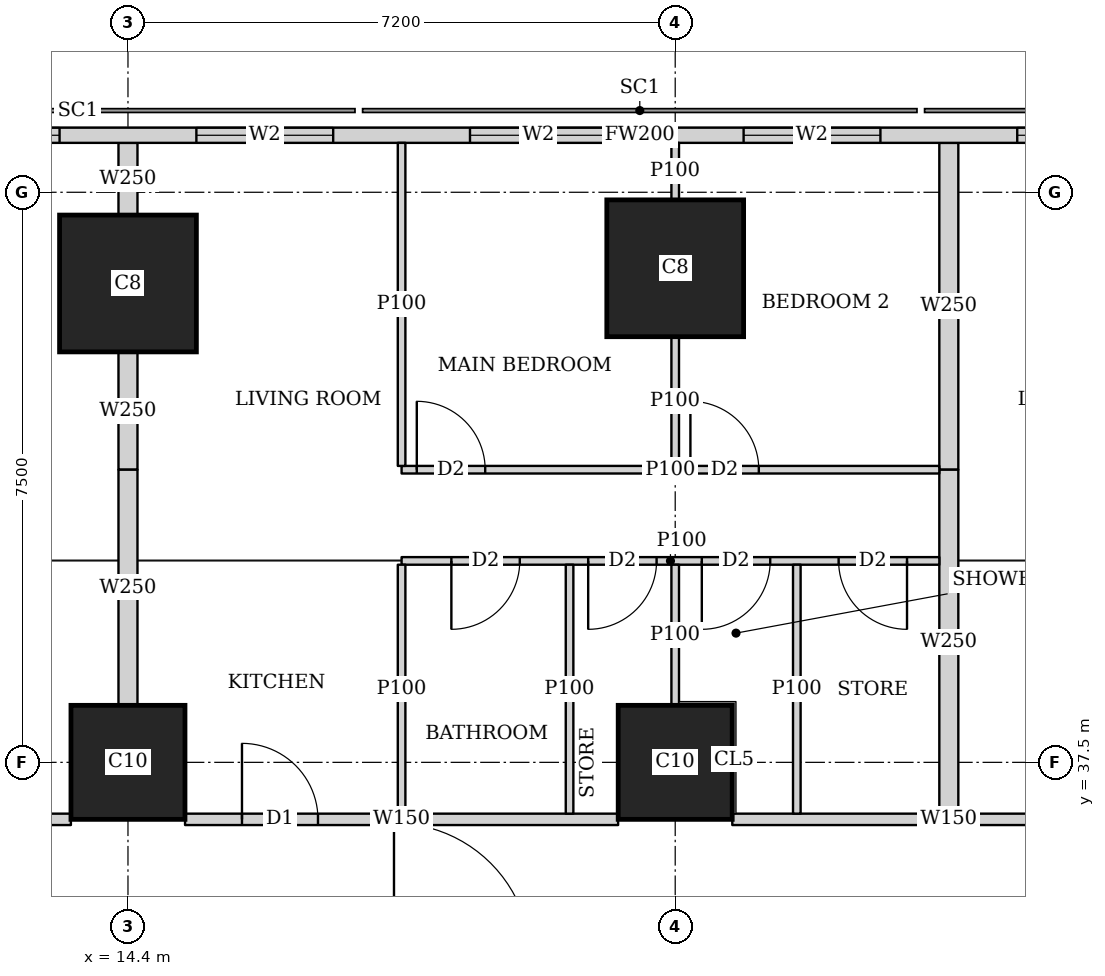
"""IFC4 building model, lengths in metres.
Left out: names, types, materials, properties, quantities, classifications, styles, units other than length and angle.
Written with IfcOpenShell. Run it as: python <this file> out.ifc"""

import sys

from ifc_helpers import new_model, si_unit, direction, frame, frame_2d, origin, origin_2d, place, context, subcontext, project, spatial, rectangle, extrude, element, fill, save


model = new_model("IFC4")
c1 = context("Model", 3, precision=1e-05, world=origin(), true_north=direction((0.0, 1.0)))
c2 = subcontext(c1, "Body", "Model", "MODEL_VIEW")
j1 = project(units=[si_unit("LENGTHUNIT", "METRE"), si_unit("PLANEANGLEUNIT", "RADIAN")], contexts=[c1])
p1 = place(None, origin())
s1 = spatial("IfcSite", under=j1, at=p1, CompositionType="ELEMENT")
p2 = place(p1, origin())
s2 = spatial("IfcBuilding", under=s1, at=p2, CompositionType="ELEMENT")
p3 = place(p2, frame((0.0, 0.0, 147.05)))
s3 = spatial("IfcBuildingStorey", under=s2, at=p3, CompositionType="ELEMENT", Elevation=147.05)
for number, where, z_axis, x_axis in (
    (1, (14.4, 37.5, 0.0), (0.0, 0.0, 1.0), (1.0, 0.0, 0.0)),
    (2, (21.6, 37.5, 0.0), (0.0, 0.0, 1.0), (1.0, 0.0, 0.0)),
):
    element("IfcColumn", number, at=place(p3, frame(where, z_axis=z_axis, x_axis=x_axis)), inside=s3, PredefinedType="COLUMN", context=c2, shape_type="SweptSolid", body=[
        extrude(rectangle(XDim=1.5, YDim=1.5, at=origin_2d()), origin(), (0.0, 0.0, 1.0), 3.75),
    ])
for number, where, z_axis, x_axis in (
    (3, (14.4, 43.8, 0.0), (0.0, 0.0, 1.0), (1.0, 0.0, 0.0)),
    (4, (21.6, 44.0, 0.0), (0.0, 0.0, 1.0), (1.0, 0.0, 0.0)),
):
    element("IfcColumn", number, at=place(p3, frame(where, z_axis=z_axis, x_axis=x_axis)), inside=s3, PredefinedType="COLUMN", context=c2, shape_type="SweptSolid", body=[
        extrude(rectangle(XDim=1.8, YDim=1.8, at=origin_2d()), origin(), (0.0, 0.0, 1.0), 3.75),
    ])
p4 = place(p3, frame((40.106, 45.75, 0.0), z_axis=(0.0, 0.0, 1.0), x_axis=(-1.0, 0.0, 0.0)))
e5 = element("IfcWall", 5, at=p4, inside=s3, PredefinedType="SOLIDWALL", context=c2, shape_type="SweptSolid", body=[
    extrude(rectangle(XDim=37.943, YDim=0.2, at=frame_2d((18.971, 0.0))), origin(), (0.0, 0.0, 1.0), 3.5),
])
p5 = place(p4, frame((8.606, 0.0, 0.9)))
e6 = element("IfcOpeningElement", 6, at=p5, cuts=e5, PredefinedType="OPENING", context=c2, shape_type="SweptSolid", body=[
    extrude(rectangle(XDim=1.8, YDim=1.5, at=frame_2d((0.9, 0.75))), frame((0.0, 0.11, 0.0), z_axis=(0.0, -1.0, 0.0), x_axis=(1.0, 0.0, 0.0)), (0.0, 0.0, 1.0), 0.22),
])
p6 = place(p4, frame((12.206, 0.0, 0.9)))
e7 = element("IfcOpeningElement", 7, at=p6, cuts=e5, PredefinedType="OPENING", context=c2, shape_type="SweptSolid", body=[
    extrude(rectangle(XDim=1.8, YDim=1.5, at=frame_2d((0.9, 0.75))), frame((0.0, 0.11, 0.0), z_axis=(0.0, -1.0, 0.0), x_axis=(1.0, 0.0, 0.0)), (0.0, 0.0, 1.0), 0.22),
])
p7 = place(p4, frame((15.806, 0.0, 0.9)))
e8 = element("IfcOpeningElement", 8, at=p7, cuts=e5, PredefinedType="OPENING", context=c2, shape_type="SweptSolid", body=[
    extrude(rectangle(XDim=1.8, YDim=1.5, at=frame_2d((0.9, 0.75))), frame((0.0, 0.11, 0.0), z_axis=(0.0, -1.0, 0.0), x_axis=(1.0, 0.0, 0.0)), (0.0, 0.0, 1.0), 0.22),
])
p8 = place(p4, frame((19.406, 0.0, 0.9)))
e9 = element("IfcOpeningElement", 9, at=p8, cuts=e5, PredefinedType="OPENING", context=c2, shape_type="SweptSolid", body=[
    extrude(rectangle(XDim=1.8, YDim=1.5, at=frame_2d((0.9, 0.75))), frame((0.0, 0.11, 0.0), z_axis=(0.0, -1.0, 0.0), x_axis=(1.0, 0.0, 0.0)), (0.0, 0.0, 1.0), 0.22),
])
p9 = place(p4, frame((23.006, 0.0, 0.9)))
e10 = element("IfcOpeningElement", 10, at=p9, cuts=e5, PredefinedType="OPENING", context=c2, shape_type="SweptSolid", body=[
    extrude(rectangle(XDim=1.8, YDim=1.5, at=frame_2d((0.9, 0.75))), frame((0.0, 0.11, 0.0), z_axis=(0.0, -1.0, 0.0), x_axis=(1.0, 0.0, 0.0)), (0.0, 0.0, 1.0), 0.22),
])
p10 = place(p4, frame((26.606, 0.0, 0.9)))
e11 = element("IfcOpeningElement", 11, at=p10, cuts=e5, PredefinedType="OPENING", context=c2, shape_type="SweptSolid", body=[
    extrude(rectangle(XDim=1.8, YDim=1.5, at=frame_2d((0.9, 0.75))), frame((0.0, 0.11, 0.0), z_axis=(0.0, -1.0, 0.0), x_axis=(1.0, 0.0, 0.0)), (0.0, 0.0, 1.0), 0.22),
])
p11 = place(p3, frame((8.1, 36.75, 0.0), z_axis=(0.0, 0.0, 1.0), x_axis=(1.0, 0.0, 0.0)))
e12 = element("IfcWall", 12, at=p11, inside=s3, PredefinedType="SOLIDWALL", context=c2, shape_type="SweptSolid", body=[
    extrude(rectangle(XDim=5.549, YDim=0.15, at=frame_2d((2.774, 0.0))), origin(), (0.0, 0.0, 1.0), 3.5),
])
p12 = place(p11, frame((3.739, 0.0, 0.0)))
e13 = element("IfcOpeningElement", 13, at=p12, cuts=e12, PredefinedType="OPENING", context=c2, shape_type="SweptSolid", body=[
    extrude(rectangle(XDim=1.0, YDim=2.1, at=frame_2d((0.5, 1.05))), frame((0.0, 0.085, 0.0), z_axis=(0.0, -1.0, 0.0), x_axis=(1.0, 0.0, 0.0)), (0.0, 0.0, 1.0), 0.17),
])
p13 = place(p3, frame((15.151, 36.75, 0.0), z_axis=(0.0, 0.0, 1.0), x_axis=(1.0, 0.0, 0.0)))
e14 = element("IfcWall", 14, at=p13, inside=s3, PredefinedType="SOLIDWALL", context=c2, shape_type="SweptSolid", body=[
    extrude(rectangle(XDim=5.698, YDim=0.15, at=frame_2d((2.849, 0.0))), origin(), (0.0, 0.0, 1.0), 3.5),
])
p14 = place(p13, frame((0.749, 0.0, 0.0)))
e15 = element("IfcOpeningElement", 15, at=p14, cuts=e14, PredefinedType="OPENING", context=c2, shape_type="SweptSolid", body=[
    extrude(rectangle(XDim=1.0, YDim=2.1, at=frame_2d((0.5, 1.05))), frame((0.0, 0.085, 0.0), z_axis=(0.0, -1.0, 0.0), x_axis=(1.0, 0.0, 0.0)), (0.0, 0.0, 1.0), 0.17),
])
p15 = place(p3, frame((22.351, 36.75, 0.0), z_axis=(0.0, 0.0, 1.0), x_axis=(1.0, 0.0, 0.0)))
e16 = element("IfcWall", 16, at=p15, inside=s3, PredefinedType="SOLIDWALL", context=c2, shape_type="SweptSolid", body=[
    extrude(rectangle(XDim=5.698, YDim=0.15, at=frame_2d((2.849, 0.0))), origin(), (0.0, 0.0, 1.0), 3.5),
])
p16 = place(p15, frame((4.032, 0.0, 0.0)))
e17 = element("IfcOpeningElement", 17, at=p16, cuts=e16, PredefinedType="OPENING", context=c2, shape_type="SweptSolid", body=[
    extrude(rectangle(XDim=1.0, YDim=2.1, at=frame_2d((0.5, 1.05))), frame((0.0, 0.085, 0.0), z_axis=(0.0, -1.0, 0.0), x_axis=(1.0, 0.0, 0.0)), (0.0, 0.0, 1.0), 0.17),
])
p17 = place(p3, frame((18.0, 41.35, 0.0), z_axis=(0.0, 0.0, 1.0), x_axis=(1.0, 0.0, 0.0)))
e18 = element("IfcWall", 18, at=p17, inside=s3, PredefinedType="PARTITIONING", context=c2, shape_type="SweptSolid", body=[
    extrude(rectangle(XDim=7.075, YDim=0.1, at=frame_2d((3.538, 0.0))), origin(), (0.0, 0.0, 1.0), 3.5),
])
p18 = place(p17, frame((0.2, 0.0, 0.0)))
e19 = element("IfcOpeningElement", 19, at=p18, cuts=e18, PredefinedType="OPENING", context=c2, shape_type="SweptSolid", body=[
    extrude(rectangle(XDim=0.9, YDim=2.1, at=frame_2d((0.45, 1.05))), frame((0.0, 0.06, 0.0), z_axis=(0.0, -1.0, 0.0), x_axis=(1.0, 0.0, 0.0)), (0.0, 0.0, 1.0), 0.12),
])
p19 = place(p17, frame((3.8, 0.0, 0.0)))
e20 = element("IfcOpeningElement", 20, at=p19, cuts=e18, PredefinedType="OPENING", context=c2, shape_type="SweptSolid", body=[
    extrude(rectangle(XDim=0.9, YDim=2.1, at=frame_2d((0.45, 1.05))), frame((0.0, 0.06, 0.0), z_axis=(0.0, -1.0, 0.0), x_axis=(1.0, 0.0, 0.0)), (0.0, 0.0, 1.0), 0.12),
])
p20 = place(p3, frame((18.0, 40.15, 0.0), z_axis=(0.0, 0.0, 1.0), x_axis=(1.0, 0.0, 0.0)))
e21 = element("IfcWall", 21, at=p20, inside=s3, PredefinedType="PARTITIONING", context=c2, shape_type="SweptSolid", body=[
    extrude(rectangle(XDim=7.075, YDim=0.1, at=frame_2d((3.538, 0.0))), origin(), (0.0, 0.0, 1.0), 3.5),
])
p21 = place(p20, frame((0.655, 0.0, 0.0)))
e22 = element("IfcOpeningElement", 22, at=p21, cuts=e21, PredefinedType="OPENING", context=c2, shape_type="SweptSolid", body=[
    extrude(rectangle(XDim=0.9, YDim=2.1, at=frame_2d((0.45, 1.05))), frame((0.0, 0.06, 0.0), z_axis=(0.0, -1.0, 0.0), x_axis=(1.0, 0.0, 0.0)), (0.0, 0.0, 1.0), 0.12),
])
p22 = place(p20, frame((3.95, 0.0, 0.0)))
e23 = element("IfcOpeningElement", 23, at=p22, cuts=e21, PredefinedType="OPENING", context=c2, shape_type="SweptSolid", body=[
    extrude(rectangle(XDim=0.9, YDim=2.1, at=frame_2d((0.45, 1.05))), frame((0.0, 0.06, 0.0), z_axis=(0.0, -1.0, 0.0), x_axis=(1.0, 0.0, 0.0)), (0.0, 0.0, 1.0), 0.12),
])
p23 = place(p20, frame((2.455, 0.0, 0.0)))
e24 = element("IfcOpeningElement", 24, at=p23, cuts=e21, PredefinedType="OPENING", context=c2, shape_type="SweptSolid", body=[
    extrude(rectangle(XDim=0.9, YDim=2.1, at=frame_2d((0.45, 1.05))), frame((0.0, 0.06, 0.0), z_axis=(0.0, -1.0, 0.0), x_axis=(1.0, 0.0, 0.0)), (0.0, 0.0, 1.0), 0.12),
])
p24 = place(p20, frame((5.75, 0.0, 0.0)))
e25 = element("IfcOpeningElement", 25, at=p24, cuts=e21, PredefinedType="OPENING", context=c2, shape_type="SweptSolid", body=[
    extrude(rectangle(XDim=0.9, YDim=2.1, at=frame_2d((0.45, 1.05))), frame((0.0, 0.06, 0.0), z_axis=(0.0, -1.0, 0.0), x_axis=(1.0, 0.0, 0.0)), (0.0, 0.0, 1.0), 0.12),
])
p25 = place(p3, frame((18.0, 41.4, 0.0), z_axis=(0.0, 0.0, 1.0), x_axis=(0.0, 1.0, 0.0)))
e26 = element("IfcWall", 26, at=p25, inside=s3, PredefinedType="PARTITIONING", context=c2, shape_type="SweptSolid", body=[
    extrude(rectangle(XDim=4.25, YDim=0.1, at=frame_2d((2.125, 0.0))), origin(), (0.0, 0.0, 1.0), 2.1),
])
p26 = place(p3, frame((21.6, 41.4, 0.0), z_axis=(0.0, 0.0, 1.0), x_axis=(0.0, 1.0, 0.0)))
e27 = element("IfcWall", 27, at=p26, inside=s3, PredefinedType="PARTITIONING", context=c2, shape_type="SweptSolid", body=[
    extrude(rectangle(XDim=1.699, YDim=0.1, at=frame_2d((0.85, 0.0))), origin(), (0.0, 0.0, 1.0), 3.5),
])
p27 = place(p3, frame((21.6, 44.901, 0.0), z_axis=(0.0, 0.0, 1.0), x_axis=(0.0, 1.0, 0.0)))
e28 = element("IfcWall", 28, at=p27, inside=s3, PredefinedType="PARTITIONING", context=c2, shape_type="SweptSolid", body=[
    extrude(rectangle(XDim=0.749, YDim=0.1, at=frame_2d((0.375, 0.0))), origin(), (0.0, 0.0, 1.0), 3.5),
])
p28 = place(p3, frame((18.0, 36.825, 0.0), z_axis=(0.0, 0.0, 1.0), x_axis=(0.0, 1.0, 0.0)))
e29 = element("IfcWall", 29, at=p28, inside=s3, PredefinedType="PARTITIONING", context=c2, shape_type="SweptSolid", body=[
    extrude(rectangle(XDim=3.275, YDim=0.1, at=frame_2d((1.638, 0.0))), origin(), (0.0, 0.0, 1.0), 3.5),
])
p29 = place(p3, frame((21.6, 38.251, 0.0), z_axis=(0.0, 0.0, 1.0), x_axis=(0.0, 1.0, 0.0)))
e30 = element("IfcWall", 30, at=p29, inside=s3, PredefinedType="PARTITIONING", context=c2, shape_type="SweptSolid", body=[
    extrude(rectangle(XDim=1.849, YDim=0.1, at=frame_2d((0.925, 0.0))), origin(), (0.0, 0.0, 1.0), 3.5),
])
for number, where, z_axis, x_axis in (
    (31, (20.21, 36.825, 0.0), (0.0, 0.0, 1.0), (0.0, 1.0, 0.0)),
    (32, (23.2, 36.825, 0.0), (0.0, 0.0, 1.0), (0.0, 1.0, 0.0)),
):
    element("IfcWall", number, at=place(p3, frame(where, z_axis=z_axis, x_axis=x_axis)), inside=s3, PredefinedType="PARTITIONING", context=c2, shape_type="SweptSolid", body=[
        extrude(rectangle(XDim=3.275, YDim=0.1, at=frame_2d((1.638, 0.0))), origin(), (0.0, 0.0, 1.0), 3.5),
    ])
p30 = place(p3, frame((14.4, 41.35, 0.0), z_axis=(0.0, 0.0, 1.0), x_axis=(0.0, 1.0, 0.0)))
e33 = element("IfcWall", 33, at=p30, inside=s3, PredefinedType="SOLIDWALL", context=c2, shape_type="SweptSolid", body=[
    extrude(rectangle(XDim=1.549, YDim=0.25, at=frame_2d((0.774, 0.0))), origin(), (0.0, 0.0, 1.0), 2.1),
])
p31 = place(p3, frame((14.4, 44.701, 0.0), z_axis=(0.0, 0.0, 1.0), x_axis=(0.0, 1.0, 0.0)))
e34 = element("IfcWall", 34, at=p31, inside=s3, PredefinedType="SOLIDWALL", context=c2, shape_type="SweptSolid", body=[
    extrude(rectangle(XDim=0.949, YDim=0.25, at=frame_2d((0.475, 0.0))), origin(), (0.0, 0.0, 1.0), 2.1),
])
p32 = place(p3, frame((14.4, 38.251, 0.0), z_axis=(0.0, 0.0, 1.0), x_axis=(0.0, 1.0, 0.0)))
e35 = element("IfcWall", 35, at=p32, inside=s3, PredefinedType="SOLIDWALL", context=c2, shape_type="SweptSolid", body=[
    extrude(rectangle(XDim=3.099, YDim=0.25, at=frame_2d((1.55, 0.0))), origin(), (0.0, 0.0, 1.0), 3.5),
])
p33 = place(p3, frame((25.2, 41.35, 0.0), z_axis=(0.0, 0.0, 1.0), x_axis=(0.0, 1.0, 0.0)))
e36 = element("IfcWall", 36, at=p33, inside=s3, PredefinedType="SOLIDWALL", context=c2, shape_type="SweptSolid", body=[
    extrude(rectangle(XDim=4.3, YDim=0.25, at=frame_2d((2.15, 0.0))), origin(), (0.0, 0.0, 1.0), 2.1),
])
p34 = place(p3, frame((25.2, 36.825, 0.0), z_axis=(0.0, 0.0, 1.0), x_axis=(0.0, 1.0, 0.0)))
e37 = element("IfcWall", 37, at=p34, inside=s3, PredefinedType="SOLIDWALL", context=c2, shape_type="SweptSolid", body=[
    extrude(rectangle(XDim=4.525, YDim=0.25, at=frame_2d((2.263, 0.0))), origin(), (0.0, 0.0, 1.0), 3.5),
])
p35 = place(p6, origin())
e38 = element("IfcWindow", 38, at=p35, inside=s3, PartitioningType="SINGLE_PANEL", PredefinedType="WINDOW", context=c2, shape_type="SweptSolid", body=[
    extrude(rectangle(XDim=1.8, YDim=1.5, at=frame_2d((0.9, 0.75))), frame((0.0, 0.03, 0.0), z_axis=(0.0, -1.0, 0.0), x_axis=(1.0, 0.0, 0.0)), (0.0, 0.0, 1.0), 0.06),
])
fill(e7, e38)
p36 = place(p7, origin())
e39 = element("IfcWindow", 39, at=p36, inside=s3, PartitioningType="SINGLE_PANEL", PredefinedType="WINDOW", context=c2, shape_type="SweptSolid", body=[
    extrude(rectangle(XDim=1.8, YDim=1.5, at=frame_2d((0.9, 0.75))), frame((0.0, 0.03, 0.0), z_axis=(0.0, -1.0, 0.0), x_axis=(1.0, 0.0, 0.0)), (0.0, 0.0, 1.0), 0.06),
])
fill(e8, e39)
p37 = place(p8, origin())
e40 = element("IfcWindow", 40, at=p37, inside=s3, PartitioningType="SINGLE_PANEL", PredefinedType="WINDOW", context=c2, shape_type="SweptSolid", body=[
    extrude(rectangle(XDim=1.8, YDim=1.5, at=frame_2d((0.9, 0.75))), frame((0.0, 0.03, 0.0), z_axis=(0.0, -1.0, 0.0), x_axis=(1.0, 0.0, 0.0)), (0.0, 0.0, 1.0), 0.06),
])
fill(e9, e40)
p38 = place(p9, origin())
e41 = element("IfcWindow", 41, at=p38, inside=s3, PartitioningType="SINGLE_PANEL", PredefinedType="WINDOW", context=c2, shape_type="SweptSolid", body=[
    extrude(rectangle(XDim=1.8, YDim=1.5, at=frame_2d((0.9, 0.75))), frame((0.0, 0.03, 0.0), z_axis=(0.0, -1.0, 0.0), x_axis=(1.0, 0.0, 0.0)), (0.0, 0.0, 1.0), 0.06),
])
fill(e10, e41)
p39 = place(p10, origin())
e42 = element("IfcWindow", 42, at=p39, inside=s3, PartitioningType="SINGLE_PANEL", PredefinedType="WINDOW", context=c2, shape_type="SweptSolid", body=[
    extrude(rectangle(XDim=1.8, YDim=1.5, at=frame_2d((0.9, 0.75))), frame((0.0, 0.03, 0.0), z_axis=(0.0, -1.0, 0.0), x_axis=(1.0, 0.0, 0.0)), (0.0, 0.0, 1.0), 0.06),
])
fill(e11, e42)
p40 = place(p18, origin())
e43 = element("IfcDoor", 43, at=p40, inside=s3, OperationType="SINGLE_SWING_LEFT", PredefinedType="DOOR", context=c2, shape_type="SweptSolid", body=[
    extrude(rectangle(XDim=0.9, YDim=2.1, at=frame_2d((0.45, 1.05))), frame((0.0, 0.025, 0.0), z_axis=(0.0, -1.0, 0.0), x_axis=(1.0, 0.0, 0.0)), (0.0, 0.0, 1.0), 0.05),
])
fill(e19, e43)
p41 = place(p19, origin())
e44 = element("IfcDoor", 44, at=p41, inside=s3, OperationType="SINGLE_SWING_LEFT", PredefinedType="DOOR", context=c2, shape_type="SweptSolid", body=[
    extrude(rectangle(XDim=0.9, YDim=2.1, at=frame_2d((0.45, 1.05))), frame((0.0, 0.025, 0.0), z_axis=(0.0, -1.0, 0.0), x_axis=(1.0, 0.0, 0.0)), (0.0, 0.0, 1.0), 0.05),
])
fill(e20, e44)
p42 = place(p21, origin())
e45 = element("IfcDoor", 45, at=p42, inside=s3, OperationType="SINGLE_SWING_RIGHT", PredefinedType="DOOR", context=c2, shape_type="SweptSolid", body=[
    extrude(rectangle(XDim=0.9, YDim=2.1, at=frame_2d((0.45, 1.05))), frame((0.0, 0.025, 0.0), z_axis=(0.0, -1.0, 0.0), x_axis=(1.0, 0.0, 0.0)), (0.0, 0.0, 1.0), 0.05),
])
fill(e22, e45)
p43 = place(p22, origin())
e46 = element("IfcDoor", 46, at=p43, inside=s3, OperationType="SINGLE_SWING_RIGHT", PredefinedType="DOOR", context=c2, shape_type="SweptSolid", body=[
    extrude(rectangle(XDim=0.9, YDim=2.1, at=frame_2d((0.45, 1.05))), frame((0.0, 0.025, 0.0), z_axis=(0.0, -1.0, 0.0), x_axis=(1.0, 0.0, 0.0)), (0.0, 0.0, 1.0), 0.05),
])
fill(e23, e46)
p44 = place(p23, origin())
e47 = element("IfcDoor", 47, at=p44, inside=s3, OperationType="SINGLE_SWING_RIGHT", PredefinedType="DOOR", context=c2, shape_type="SweptSolid", body=[
    extrude(rectangle(XDim=0.9, YDim=2.1, at=frame_2d((0.45, 1.05))), frame((0.0, 0.025, 0.0), z_axis=(0.0, -1.0, 0.0), x_axis=(1.0, 0.0, 0.0)), (0.0, 0.0, 1.0), 0.05),
])
fill(e24, e47)
p45 = place(p24, origin())
e48 = element("IfcDoor", 48, at=p45, inside=s3, OperationType="SINGLE_SWING_LEFT", PredefinedType="DOOR", context=c2, shape_type="SweptSolid", body=[
    extrude(rectangle(XDim=0.9, YDim=2.1, at=frame_2d((0.45, 1.05))), frame((0.0, 0.025, 0.0), z_axis=(0.0, -1.0, 0.0), x_axis=(1.0, 0.0, 0.0)), (0.0, 0.0, 1.0), 0.05),
])
fill(e25, e48)
p46 = place(p14, origin())
e49 = element("IfcDoor", 49, at=p46, inside=s3, OperationType="SINGLE_SWING_LEFT", PredefinedType="DOOR", context=c2, shape_type="SweptSolid", body=[
    extrude(rectangle(XDim=1.0, YDim=2.1, at=frame_2d((0.5, 1.05))), frame((0.0, 0.025, 0.0), z_axis=(0.0, -1.0, 0.0), x_axis=(1.0, 0.0, 0.0)), (0.0, 0.0, 1.0), 0.05),
])
fill(e15, e49)
save(model, sys.argv[1])
